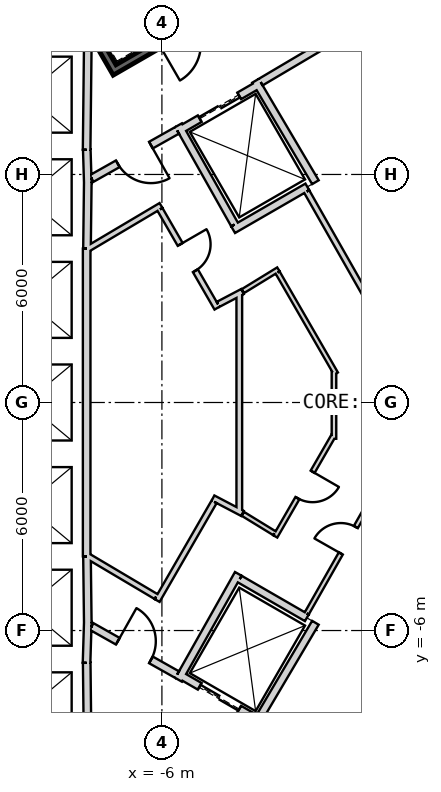
"""IFC4 building model, lengths in metres.
Left out: names, types, materials, properties, quantities, classifications, styles, units other than length and angle.
Written with IfcOpenShell. Run it as: python <this file> out.ifc"""

import sys

from ifc_helpers import new_model, si_unit, direction, frame, frame_2d, origin, place, context, subcontext, project, spatial, rectangle, extrude, element, fill, save


model = new_model("IFC4")
c1 = context("Model", 3, precision=1e-05, world=origin(), true_north=direction((0.0, 1.0)))
c2 = subcontext(c1, "Body", "Model", "MODEL_VIEW")
j1 = project(units=[si_unit("LENGTHUNIT", "METRE"), si_unit("PLANEANGLEUNIT", "RADIAN")], contexts=[c1])
p1 = place(None, origin())
s1 = spatial("IfcSite", under=j1, at=p1, CompositionType="ELEMENT")
p2 = place(p1, origin())
s2 = spatial("IfcBuilding", under=s1, at=p2, CompositionType="ELEMENT")
p3 = place(p2, frame((0.0, 0.0, 380.6)))
s3 = spatial("IfcBuildingStorey", under=s2, at=p3, CompositionType="ELEMENT", Elevation=380.6)
p4 = place(p3, frame((19.475, 2.208, 0.0), z_axis=(0.0, 0.0, 1.0), x_axis=(-0.866028369851, 0.499994862586, 0.0)))
e1 = element("IfcWall", 1, at=p4, inside=s3, PredefinedType="SHEAR", context=c2, shape_type="SweptSolid", body=[
    extrude(rectangle(XDim=31.523, YDim=0.9, at=frame_2d((15.762, 0.0))), origin(), (0.0, 0.0, 1.0), 3.9),
])
p5 = place(p4, frame((7.062, 0.0, 0.0)))
e2 = element("IfcOpeningElement", 2, at=p5, cuts=e1, PredefinedType="OPENING", context=c2, shape_type="SweptSolid", body=[
    extrude(rectangle(XDim=1.2, YDim=2.4, at=frame_2d((0.6, 1.2))), frame((0.0, 0.46, 0.0), z_axis=(0.0, -1.0, 0.0), x_axis=(1.0, 0.0, 0.0)), (0.0, 0.0, 1.0), 0.92),
])
p6 = place(p4, frame((3.612, 0.0, 0.0)))
e3 = element("IfcOpeningElement", 3, at=p6, cuts=e1, PredefinedType="OPENING", context=c2, shape_type="SweptSolid", body=[
    extrude(rectangle(XDim=1.2, YDim=2.4, at=frame_2d((0.6, 1.2))), frame((0.0, 0.46, 0.0), z_axis=(0.0, -1.0, 0.0), x_axis=(1.0, 0.0, 0.0)), (0.0, 0.0, 1.0), 0.92),
])
p7 = place(p4, frame((26.712, 0.0, 0.0)))
e4 = element("IfcOpeningElement", 4, at=p7, cuts=e1, PredefinedType="OPENING", context=c2, shape_type="SweptSolid", body=[
    extrude(rectangle(XDim=1.2, YDim=2.4, at=frame_2d((0.6, 1.2))), frame((0.0, 0.46, 0.0), z_axis=(0.0, -1.0, 0.0), x_axis=(1.0, 0.0, 0.0)), (0.0, 0.0, 1.0), 0.92),
])
p8 = place(p3, frame((-7.825, -17.97, 0.0), z_axis=(0.0, 0.0, 1.0), x_axis=(0.866028369851, 0.499994862586, 0.0)))
e5 = element("IfcWall", 5, at=p8, inside=s3, PredefinedType="SHEAR", context=c2, shape_type="SweptSolid", body=[
    extrude(rectangle(XDim=31.523, YDim=0.9, at=frame_2d((15.762, 0.0))), origin(), (0.0, 0.0, 1.0), 3.9),
])
p9 = place(p8, frame((17.862, 0.0, 0.0)))
e6 = element("IfcOpeningElement", 6, at=p9, cuts=e5, PredefinedType="OPENING", context=c2, shape_type="SweptSolid", body=[
    extrude(rectangle(XDim=1.2, YDim=2.4, at=frame_2d((0.6, 1.2))), frame((0.0, 0.46, 0.0), z_axis=(0.0, -1.0, 0.0), x_axis=(1.0, 0.0, 0.0)), (0.0, 0.0, 1.0), 0.92),
])
p10 = place(p8, frame((20.562, 0.0, 0.0)))
e7 = element("IfcOpeningElement", 7, at=p10, cuts=e5, PredefinedType="OPENING", context=c2, shape_type="SweptSolid", body=[
    extrude(rectangle(XDim=1.2, YDim=2.4, at=frame_2d((0.6, 1.2))), frame((0.0, 0.46, 0.0), z_axis=(0.0, -1.0, 0.0), x_axis=(1.0, 0.0, 0.0)), (0.0, 0.0, 1.0), 0.92),
])
p11 = place(p8, frame((26.712, 0.0, 0.0)))
e8 = element("IfcOpeningElement", 8, at=p11, cuts=e5, PredefinedType="OPENING", context=c2, shape_type="SweptSolid", body=[
    extrude(rectangle(XDim=1.2, YDim=2.4, at=frame_2d((0.6, 1.2))), frame((0.0, 0.46, 0.0), z_axis=(0.0, -1.0, 0.0), x_axis=(1.0, 0.0, 0.0)), (0.0, 0.0, 1.0), 0.92),
])
p12 = place(p8, frame((3.612, 0.0, 0.0)))
e9 = element("IfcOpeningElement", 9, at=p12, cuts=e5, PredefinedType="OPENING", context=c2, shape_type="SweptSolid", body=[
    extrude(rectangle(XDim=1.2, YDim=2.4, at=frame_2d((0.6, 1.2))), frame((0.0, 0.46, 0.0), z_axis=(0.0, -1.0, 0.0), x_axis=(1.0, 0.0, 0.0)), (0.0, 0.0, 1.0), 0.92),
])
p13 = place(p3, frame((-7.951, 9.35, 0.0), z_axis=(0.0, 0.0, 1.0), x_axis=(-0.011120469654, -0.999938165666, 0.0)))
e10 = element("IfcWall", 10, at=p13, inside=s3, PredefinedType="PLUMBINGWALL", context=c2, shape_type="SweptSolid", body=[
    extrude(rectangle(XDim=2.7, YDim=0.2, at=frame_2d((1.35, 0.0))), origin(), (0.0, 0.0, 1.0), 3.6),
])
p14 = place(p3, frame((-7.977, 6.65, 0.0), z_axis=(0.0, 0.0, 1.0), x_axis=(0.030861509705, -0.999523670164, 0.0)))
e11 = element("IfcWall", 11, at=p14, inside=s3, PredefinedType="PLUMBINGWALL", context=c2, shape_type="SweptSolid", body=[
    extrude(rectangle(XDim=0.878, YDim=0.2, at=frame_2d((0.439, 0.0))), origin(), (0.0, 0.0, 1.0), 3.6),
])
p15 = place(p3, frame((-7.949, 5.894, 0.0), z_axis=(0.0, 0.0, 1.0), x_axis=(-0.016809909365, -0.999858703491, 0.0)))
e12 = element("IfcWall", 12, at=p15, inside=s3, PredefinedType="PLUMBINGWALL", context=c2, shape_type="SweptSolid", body=[
    extrude(rectangle(XDim=1.844, YDim=0.2, at=frame_2d((0.922, 0.0))), origin(), (0.0, 0.0, 1.0), 3.6),
])
p16 = place(p3, frame((-7.98, 4.05, 0.0), z_axis=(0.0, 0.0, 1.0), x_axis=(0.0, -1.0, 0.0)))
e13 = element("IfcWall", 13, at=p16, inside=s3, PredefinedType="PLUMBINGWALL", context=c2, shape_type="SweptSolid", body=[
    extrude(rectangle(XDim=8.1, YDim=0.2, at=frame_2d((4.05, 0.0))), origin(), (0.0, 0.0, 1.0), 3.6),
])
p17 = place(p3, frame((-7.95, -5.772, 0.0), z_axis=(0.0, 0.0, 1.0), x_axis=(-0.030803413295, -0.999525462272, 0.0)))
e14 = element("IfcWall", 14, at=p17, inside=s3, PredefinedType="PLUMBINGWALL", context=c2, shape_type="SweptSolid", body=[
    extrude(rectangle(XDim=1.078, YDim=0.2, at=frame_2d((0.539, 0.0))), origin(), (0.0, 0.0, 1.0), 3.6),
])
p18 = place(p3, frame((-7.98, -4.05, 0.0), z_axis=(0.0, 0.0, 1.0), x_axis=(0.016809909365, -0.999858703491, 0.0)))
e15 = element("IfcWall", 15, at=p18, inside=s3, PredefinedType="PLUMBINGWALL", context=c2, shape_type="SweptSolid", body=[
    extrude(rectangle(XDim=1.844, YDim=0.2, at=frame_2d((0.922, 0.0))), origin(), (0.0, 0.0, 1.0), 3.6),
])
p19 = place(p3, frame((-7.979, -6.85, 0.0), z_axis=(0.0, 0.0, 1.0), x_axis=(0.011121475088, -0.999938154483, 0.0)))
e16 = element("IfcWall", 16, at=p19, inside=s3, PredefinedType="PLUMBINGWALL", context=c2, shape_type="SweptSolid", body=[
    extrude(rectangle(XDim=2.7, YDim=0.2, at=frame_2d((1.35, 0.0))), origin(), (0.0, 0.0, 1.0), 3.6),
])
p20 = place(p3, frame((-11.245, 15.678, -0.3), z_axis=(0.0, 0.0, 1.0), x_axis=(0.499977274689, -0.866038523851, 0.0)))
e17 = element("IfcWall", 17, at=p20, inside=s3, PredefinedType="SHEAR", context=c2, shape_type="SweptSolid", body=[
    extrude(rectangle(XDim=8.1, YDim=0.2, at=frame_2d((4.05, 0.0))), origin(), (0.0, 0.0, 1.0), 3.9),
])
p21 = place(p3, frame((-7.159, 8.8, -0.3), z_axis=(0.0, 0.0, 1.0), x_axis=(0.866047807691, 0.499961193289, 0.0)))
e18 = element("IfcWall", 18, at=p21, inside=s3, PredefinedType="SHEAR", context=c2, shape_type="SweptSolid", body=[
    extrude(rectangle(XDim=3.6, YDim=0.2, at=frame_2d((1.8, 0.0))), origin(), (0.0, 0.0, 1.0), 3.9),
])
p22 = place(p21, frame((1.25, 0.0, 0.3)))
e19 = element("IfcOpeningElement", 19, at=p22, cuts=e18, PredefinedType="OPENING", context=c2, shape_type="SweptSolid", body=[
    extrude(rectangle(XDim=1.1, YDim=2.1, at=frame_2d((0.55, 1.05))), frame((0.0, 0.11, 0.0), z_axis=(0.0, -1.0, 0.0), x_axis=(1.0, 0.0, 0.0)), (0.0, 0.0, 1.0), 0.22),
])
p23 = place(p3, frame((-5.524, 7.168, 0.0), z_axis=(0.0, 0.0, 1.0), x_axis=(0.866024647952, 0.500001309137, 0.0)))
e20 = element("IfcWall", 20, at=p23, inside=s3, PredefinedType="PLUMBINGWALL", context=c2, shape_type="SweptSolid", body=[
    extrude(rectangle(XDim=2.4, YDim=0.2, at=frame_2d((1.2, 0.0))), origin(), (0.0, 0.0, 1.0), 3.6),
])
p24 = place(p23, frame((0.6, 0.0, 0.0)))
e21 = element("IfcOpeningElement", 21, at=p24, cuts=e20, PredefinedType="OPENING", context=c2, shape_type="SweptSolid", body=[
    extrude(rectangle(XDim=1.2, YDim=2.4, at=frame_2d((0.6, 1.2))), frame((0.0, 0.11, 0.0), z_axis=(0.0, -1.0, 0.0), x_axis=(1.0, 0.0, 0.0)), (0.0, 0.0, 1.0), 0.22),
])
p25 = place(p3, frame((-4.039, 4.596, 0.0), z_axis=(0.0, 0.0, 1.0), x_axis=(-0.491322718731, 0.870977603649, 0.0)))
e22 = element("IfcWall", 22, at=p25, inside=s3, PredefinedType="PLUMBINGWALL", context=c2, shape_type="SweptSolid", body=[
    extrude(rectangle(XDim=3.1, YDim=0.2, at=frame_2d((1.55, 0.0))), origin(), (0.0, 0.0, 1.0), 3.6),
])
p26 = place(p3, frame((-3.538, 8.465, 0.0), z_axis=(0.0, 0.0, 1.0), x_axis=(0.508616218331, -0.860993346345, 0.0)))
e23 = element("IfcWall", 23, at=p26, inside=s3, PredefinedType="PLUMBINGWALL", context=c2, shape_type="SweptSolid", body=[
    extrude(rectangle(XDim=3.2, YDim=0.2, at=frame_2d((1.6, 0.0))), origin(), (0.0, 0.0, 1.0), 3.6),
])
p27 = place(p3, frame((-2.047, 5.746, 0.0), z_axis=(0.0, 0.0, 1.0), x_axis=(-0.866038900241, -0.499976622722, 0.0)))
e24 = element("IfcWall", 24, at=p27, inside=s3, PredefinedType="PLUMBINGWALL", context=c2, shape_type="SweptSolid", body=[
    extrude(rectangle(XDim=2.189, YDim=0.2, at=frame_2d((1.095, 0.0))), origin(), (0.0, 0.0, 1.0), 3.6),
])
p28 = place(p3, frame((-3.446, -8.368, 0.0), z_axis=(0.0, 0.0, 1.0), x_axis=(-0.866024647952, 0.500001309137, 0.0)))
e25 = element("IfcWall", 25, at=p28, inside=s3, PredefinedType="PLUMBINGWALL", context=c2, shape_type="SweptSolid", body=[
    extrude(rectangle(XDim=2.4, YDim=0.2, at=frame_2d((1.2, 0.0))), origin(), (0.0, 0.0, 1.0), 3.6),
])
p29 = place(p28, frame((0.6, 0.0, 0.0)))
e26 = element("IfcOpeningElement", 26, at=p29, cuts=e25, PredefinedType="OPENING", context=c2, shape_type="SweptSolid", body=[
    extrude(rectangle(XDim=1.2, YDim=2.4, at=frame_2d((0.6, 1.2))), frame((0.0, 0.11, 0.0), z_axis=(0.0, -1.0, 0.0), x_axis=(1.0, 0.0, 0.0)), (0.0, 0.0, 1.0), 0.22),
])
p30 = place(p3, frame((-5.562, -7.296, 0.0), z_axis=(0.0, 0.0, 1.0), x_axis=(0.491322718731, 0.870977603649, 0.0)))
e27 = element("IfcWall", 27, at=p30, inside=s3, PredefinedType="PLUMBINGWALL", context=c2, shape_type="SweptSolid", body=[
    extrude(rectangle(XDim=3.1, YDim=0.2, at=frame_2d((1.55, 0.0))), origin(), (0.0, 0.0, 1.0), 3.6),
])
p31 = place(p3, frame((-3.944, -4.651, 0.0), z_axis=(0.0, 0.0, 1.0), x_axis=(0.866008630453, -0.500029051137, 0.0)))
e28 = element("IfcWall", 28, at=p31, inside=s3, PredefinedType="PLUMBINGWALL", context=c2, shape_type="SweptSolid", body=[
    extrude(rectangle(XDim=2.389, YDim=0.2, at=frame_2d((1.195, 0.0))), origin(), (0.0, 0.0, 1.0), 3.6),
])
p32 = place(p3, frame((-2.012, -5.882, 0.0), z_axis=(0.0, 0.0, 1.0), x_axis=(-0.508619639323, -0.860991325447, 0.0)))
e29 = element("IfcWall", 29, at=p32, inside=s3, PredefinedType="PLUMBINGWALL", context=c2, shape_type="SweptSolid", body=[
    extrude(rectangle(XDim=3.0, YDim=0.2, at=frame_2d((1.5, 0.0))), origin(), (0.0, 0.0, 1.0), 3.6),
])
p33 = place(p3, frame((-1.024, 9.771, 0.0), z_axis=(0.0, 0.0, 1.0), x_axis=(0.866032269107, -0.499988108725, 0.0)))
e30 = element("IfcWall", 30, at=p33, inside=s3, PredefinedType="PARTITIONING", context=c2, shape_type="SweptSolid", body=[
    extrude(rectangle(XDim=1.644, YDim=0.12, at=frame_2d((0.822, 0.0))), origin(), (0.0, 0.0, 1.0), 3.6),
])
p34 = place(p33, frame((0.422, 0.0, 0.0)))
e31 = element("IfcOpeningElement", 31, at=p34, cuts=e30, PredefinedType="OPENING", context=c2, shape_type="SweptSolid", body=[
    extrude(rectangle(XDim=0.8, YDim=2.1, at=frame_2d((0.4, 1.05))), frame((0.0, 0.07, 0.0), z_axis=(0.0, -1.0, 0.0), x_axis=(1.0, 0.0, 0.0)), (0.0, 0.0, 1.0), 0.14),
])
p35 = place(p3, frame((-5.6, 7.16, 0.0), z_axis=(0.0, 0.0, 1.0), x_axis=(-0.871340486379, -0.490678873396, 0.0)))
e32 = element("IfcWall", 32, at=p35, inside=s3, PredefinedType="PARTITIONING", context=c2, shape_type="SweptSolid", body=[
    extrude(rectangle(XDim=2.581, YDim=0.2, at=frame_2d((1.291, 0.0))), origin(), (0.0, 0.0, 1.0), 3.6),
])
p36 = place(p3, frame((-1.179, 9.745, 0.0), z_axis=(0.0, 0.0, 1.0), x_axis=(-0.860630814782, -0.509229418482, 0.0)))
e33 = element("IfcWall", 33, at=p36, inside=s3, PredefinedType="PARTITIONING", context=c2, shape_type="SweptSolid", body=[
    extrude(rectangle(XDim=2.582, YDim=0.2, at=frame_2d((1.291, 0.0))), origin(), (0.0, 0.0, 1.0), 3.6),
])
p37 = place(p36, frame((0.791, 0.0, 0.0)))
e34 = element("IfcOpeningElement", 34, at=p37, cuts=e33, PredefinedType="OPENING", context=c2, shape_type="SweptSolid", body=[
    extrude(rectangle(XDim=1.0, YDim=2.1, at=frame_2d((0.5, 1.05))), frame((0.0, 0.11, 0.0), z_axis=(0.0, -1.0, 0.0), x_axis=(1.0, 0.0, 0.0)), (0.0, 0.0, 1.0), 0.22),
])
p38 = place(p3, frame((-7.849, -5.894, 0.0), z_axis=(0.0, 0.0, 1.0), x_axis=(0.871340486379, -0.490678873396, 0.0)))
e35 = element("IfcWall", 35, at=p38, inside=s3, PredefinedType="PARTITIONING", context=c2, shape_type="SweptSolid", body=[
    extrude(rectangle(XDim=2.581, YDim=0.2, at=frame_2d((1.291, 0.0))), origin(), (0.0, 0.0, 1.0), 3.6),
])
p39 = place(p3, frame((-1.637, 0.837, 0.0), z_axis=(0.0, 0.0, 1.0), x_axis=(-0.505858978646, 0.862616191433, 0.0)))
e36 = element("IfcWall", 36, at=p39, inside=s3, PredefinedType="PARTITIONING", context=c2, shape_type="SweptSolid", body=[
    extrude(rectangle(XDim=4.357, YDim=0.12, at=frame_2d((2.179, 0.0))), origin(), (0.0, 0.0, 1.0), 3.6),
])
p40 = place(p39, frame((1.83, 0.0, 0.0)))
e37 = element("IfcOpeningElement", 37, at=p40, cuts=e36, PredefinedType="OPENING", context=c2, shape_type="SweptSolid", body=[
    extrude(rectangle(XDim=0.8, YDim=2.1, at=frame_2d((0.4, 1.05))), frame((0.0, 0.07, 0.0), z_axis=(0.0, -1.0, 0.0), x_axis=(1.0, 0.0, 0.0)), (0.0, 0.0, 1.0), 0.14),
])
p41 = place(p3, frame((-1.689, -1.027, 0.0), z_axis=(0.0, 0.0, 1.0), x_axis=(0.0, 1.0, 0.0)))
e38 = element("IfcWall", 38, at=p41, inside=s3, PredefinedType="PARTITIONING", context=c2, shape_type="SweptSolid", body=[
    extrude(rectangle(XDim=1.933, YDim=0.12, at=frame_2d((0.967, 0.0))), origin(), (0.0, 0.0, 1.0), 3.6),
])
p42 = place(p3, frame((-3.841, -4.595, 0.0), z_axis=(0.0, 0.0, 1.0), x_axis=(0.505883680705, 0.862601705074, 0.0)))
e39 = element("IfcWall", 39, at=p42, inside=s3, PredefinedType="PARTITIONING", context=c2, shape_type="SweptSolid", body=[
    extrude(rectangle(XDim=4.236, YDim=0.12, at=frame_2d((2.118, 0.0))), origin(), (0.0, 0.0, 1.0), 3.6),
])
p43 = place(p3, frame((-1.477, -7.808, 0.0), z_axis=(0.0, 0.0, 1.0), x_axis=(0.871829948107, -0.48980867855, 0.0)))
e40 = element("IfcWall", 40, at=p43, inside=s3, PredefinedType="PLUMBINGWALL", context=c2, shape_type="SweptSolid", body=[
    extrude(rectangle(XDim=2.152, YDim=0.15, at=frame_2d((1.076, 0.0))), origin(), (0.0, 0.0, 1.0), 3.6),
])
p44 = place(p3, frame((-0.119, -5.664, 0.0), z_axis=(0.0, 0.0, 1.0), x_axis=(-0.509935662771, -0.860212543406, 0.0)))
e41 = element("IfcWall", 41, at=p44, inside=s3, PredefinedType="PLUMBINGWALL", context=c2, shape_type="SweptSolid", body=[
    extrude(rectangle(XDim=2.46, YDim=0.15, at=frame_2d((1.23, 0.0))), origin(), (0.0, 0.0, 1.0), 3.6),
])
p45 = place(p44, frame((0.83, 0.0, 0.0)))
e42 = element("IfcOpeningElement", 42, at=p45, cuts=e41, PredefinedType="OPENING", context=c2, shape_type="SweptSolid", body=[
    extrude(rectangle(XDim=0.8, YDim=2.1, at=frame_2d((0.4, 1.05))), frame((0.0, 0.085, 0.0), z_axis=(0.0, -1.0, 0.0), x_axis=(1.0, 0.0, 0.0)), (0.0, 0.0, 1.0), 0.17),
])
p46 = place(p3, frame((-1.436, -4.367, 0.0), z_axis=(0.0, 0.0, 1.0), x_axis=(0.866087547558, -0.499892348375, 0.0)))
e43 = element("IfcWall", 43, at=p46, inside=s3, PredefinedType="PARTITIONING", context=c2, shape_type="SweptSolid", body=[
    extrude(rectangle(XDim=1.7, YDim=0.12, at=frame_2d((0.85, 0.0))), origin(), (0.0, 0.0, 1.0), 3.6),
])
p47 = place(p3, frame((0.095, -1.835, 0.0), z_axis=(0.0, 0.0, 1.0), x_axis=(-0.499980071345, -0.866036909293, 0.0)))
e44 = element("IfcWall", 44, at=p47, inside=s3, PredefinedType="PARTITIONING", context=c2, shape_type="SweptSolid", body=[
    extrude(rectangle(XDim=2.898, YDim=0.12, at=frame_2d((1.449, 0.0))), origin(), (0.0, 0.0, 1.0), 3.6),
])
p48 = place(p3, frame((-1.421, 4.462, 0.0), z_axis=(0.0, 0.0, 1.0), x_axis=(0.499969679245, -0.866042908773, 0.0)))
e45 = element("IfcWall", 45, at=p48, inside=s3, PredefinedType="PLUMBINGWALL", context=c2, shape_type="SweptSolid", body=[
    extrude(rectangle(XDim=2.906, YDim=0.15, at=frame_2d((1.453, 0.0))), origin(), (0.0, 0.0, 1.0), 3.6),
])
p49 = place(p3, frame((0.153, 5.285, 0.0), z_axis=(0.0, 0.0, 1.0), x_axis=(-0.866025371046, -0.500000056704, 0.0)))
e46 = element("IfcWall", 46, at=p49, inside=s3, PredefinedType="PLUMBINGWALL", context=c2, shape_type="SweptSolid", body=[
    extrude(rectangle(XDim=1.7, YDim=0.15, at=frame_2d((0.85, 0.0))), origin(), (0.0, 0.0, 1.0), 3.6),
])
p50 = place(p3, frame((-1.449, 7.91, 0.0), z_axis=(0.0, 0.0, 1.0), x_axis=(0.499990139034, -0.866031096941, 0.0)))
e47 = element("IfcWall", 47, at=p50, inside=s3, PredefinedType="PLUMBINGWALL", context=c2, shape_type="SweptSolid", body=[
    extrude(rectangle(XDim=3.0, YDim=0.15, at=frame_2d((1.5, 0.0))), origin(), (0.0, 0.0, 1.0), 3.6),
])
p51 = place(p3, frame((0.399, 8.862, 0.0), z_axis=(0.0, 0.0, 1.0), x_axis=(-0.871852238349, -0.489769001148, 0.0)))
e48 = element("IfcWall", 48, at=p51, inside=s3, PredefinedType="PLUMBINGWALL", context=c2, shape_type="SweptSolid", body=[
    extrude(rectangle(XDim=2.002, YDim=0.15, at=frame_2d((1.001, 0.0))), origin(), (0.0, 0.0, 1.0), 3.6),
])
p52 = place(p37, origin())
e49 = element("IfcDoor", 49, at=p52, inside=s3, OperationType="SINGLE_SWING_RIGHT", PredefinedType="USERDEFINED", context=c2, shape_type="SweptSolid", body=[
    extrude(rectangle(XDim=1.0, YDim=2.1, at=frame_2d((0.5, 1.05))), frame((0.0, 0.025, 0.0), z_axis=(0.0, -1.0, 0.0), x_axis=(1.0, 0.0, 0.0)), (0.0, 0.0, 1.0), 0.05),
])
fill(e34, e49)
p53 = place(p24, origin())
e50 = element("IfcDoor", 50, at=p53, inside=s3, OperationType="SLIDING_TO_LEFT", PredefinedType="USERDEFINED", context=c2, shape_type="SweptSolid", body=[
    extrude(rectangle(XDim=1.2, YDim=2.4, at=frame_2d((0.6, 1.2))), frame((0.0, 0.025, 0.0), z_axis=(0.0, -1.0, 0.0), x_axis=(1.0, 0.0, 0.0)), (0.0, 0.0, 1.0), 0.05),
])
fill(e21, e50)
p54 = place(p29, origin())
e51 = element("IfcDoor", 51, at=p54, inside=s3, OperationType="SLIDING_TO_LEFT", PredefinedType="USERDEFINED", context=c2, shape_type="SweptSolid", body=[
    extrude(rectangle(XDim=1.2, YDim=2.4, at=frame_2d((0.6, 1.2))), frame((0.0, 0.025, 0.0), z_axis=(0.0, -1.0, 0.0), x_axis=(1.0, 0.0, 0.0)), (0.0, 0.0, 1.0), 0.05),
])
fill(e26, e51)
p55 = place(p40, origin())
e52 = element("IfcDoor", 52, at=p55, inside=s3, OperationType="SINGLE_SWING_RIGHT", PredefinedType="USERDEFINED", context=c2, shape_type="SweptSolid", body=[
    extrude(rectangle(XDim=0.8, YDim=2.1, at=frame_2d((0.4, 1.05))), frame((0.0, 0.025, 0.0), z_axis=(0.0, -1.0, 0.0), x_axis=(1.0, 0.0, 0.0)), (0.0, 0.0, 1.0), 0.05),
])
fill(e37, e52)
p56 = place(p45, origin())
e53 = element("IfcDoor", 53, at=p56, inside=s3, OperationType="SINGLE_SWING_LEFT", PredefinedType="USERDEFINED", context=c2, shape_type="SweptSolid", body=[
    extrude(rectangle(XDim=0.8, YDim=2.1, at=frame_2d((0.4, 1.05))), frame((0.0, 0.025, 0.0), z_axis=(0.0, -1.0, 0.0), x_axis=(1.0, 0.0, 0.0)), (0.0, 0.0, 1.0), 0.05),
])
fill(e42, e53)
save(model, sys.argv[1])
